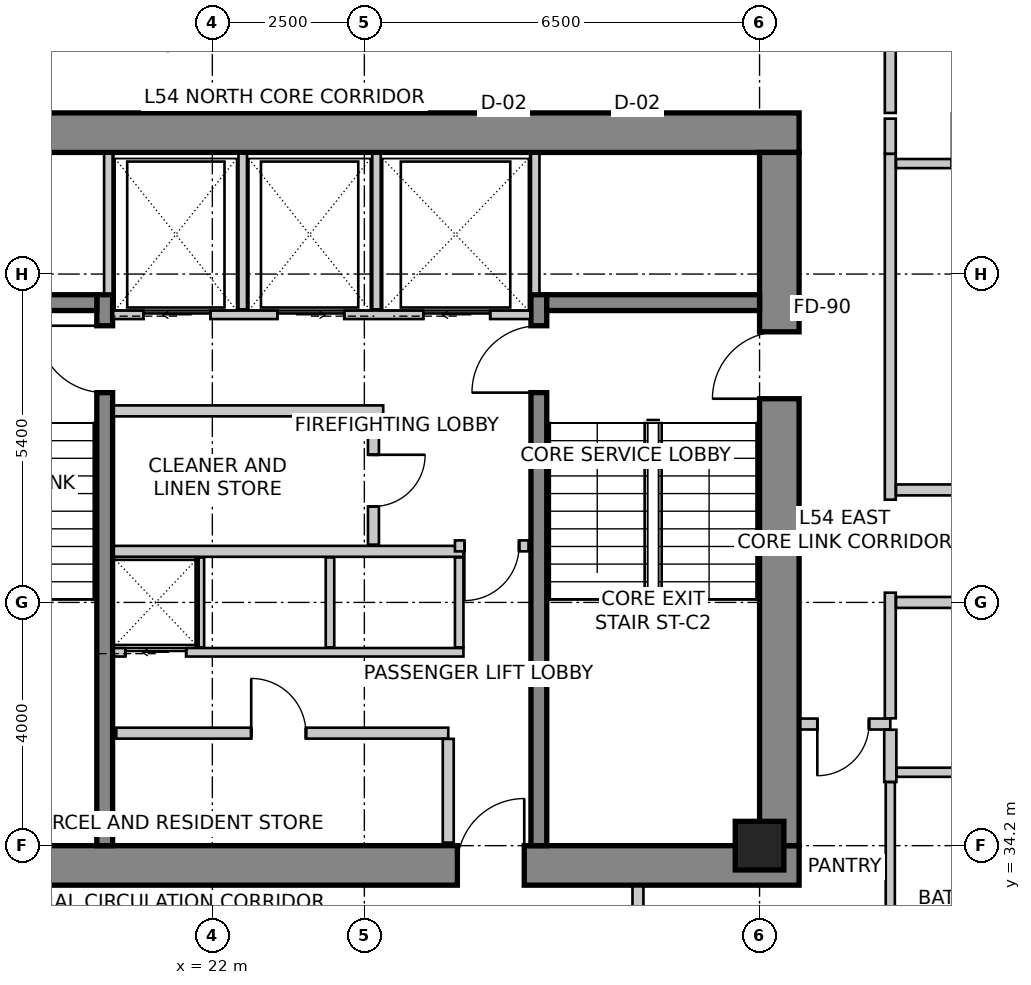
"""IFC4 building model, lengths in metres.
Left out: names, types, materials, properties, quantities, classifications, styles, units other than length and angle.
Written with IfcOpenShell. Run it as: python <this file> out.ifc"""

import sys

from ifc_helpers import new_model, si_unit, direction, frame, frame_2d, origin, origin_2d, place, context, subcontext, project, spatial, rectangle, extrude, source, transform, mapped, element, fill, save


model = new_model("IFC4")
c1 = context("Model", 3, precision=1e-05, world=origin(), true_north=direction((0.0, 1.0)))
c2 = subcontext(c1, "Body", "Model", "MODEL_VIEW")
j1 = project(units=[si_unit("LENGTHUNIT", "METRE"), si_unit("PLANEANGLEUNIT", "RADIAN")], contexts=[c1])
p1 = place(None, origin())
s1 = spatial("IfcSite", under=j1, at=p1, CompositionType="ELEMENT")
p2 = place(p1, origin())
s2 = spatial("IfcBuilding", under=s1, at=p2, CompositionType="ELEMENT")
p3 = place(p2, frame((0.0, 0.0, 214.9)))
s3 = spatial("IfcBuildingStorey", under=s2, at=p3, CompositionType="ELEMENT", Elevation=214.9)
p4 = place(p3, frame((15.95, 45.925, 0.0), z_axis=(0.0, 0.0, 1.0), x_axis=(1.0, 0.0, 0.0)))
e1 = element("IfcWall", 1, at=p4, inside=s3, PredefinedType="SHEAR", context=c2, shape_type="SweptSolid", body=[
    extrude(rectangle(XDim=15.7, YDim=0.65, at=frame_2d((7.85, 0.0))), origin(), (0.0, 0.0, 1.0), 3.5),
])
p5 = place(p3, frame((15.95, 33.875, 0.0), z_axis=(0.0, 0.0, 1.0), x_axis=(1.0, 0.0, 0.0)))
e2 = element("IfcWall", 2, at=p5, inside=s3, PredefinedType="SHEAR", context=c2, shape_type="SweptSolid", body=[
    extrude(rectangle(XDim=15.7, YDim=0.65, at=frame_2d((7.85, 0.0))), origin(), (0.0, 0.0, 1.0), 3.5),
])
m1 = source(origin(), c2, "Body", "SweptSolid", [
    extrude(rectangle(XDim=1.1, YDim=2.15, at=frame_2d((0.55, 1.075))), frame((0.0, 0.335, 0.0), z_axis=(0.0, -1.0, 0.0), x_axis=(1.0, 0.0, 0.0)), (0.0, 0.0, 1.0), 0.67),
])
p6 = place(p5, frame((10.08, 0.0, 0.0)))
e3 = element("IfcOpeningElement", 3, at=p6, cuts=e2, PredefinedType="OPENING", context=c2, shape_type="MappedRepresentation", body=[
    mapped(m1, transform((0.0, 0.0, 0.0), scale=1.0)),
])
p7 = place(p3, frame((31.325, 34.2, 0.0), z_axis=(0.0, 0.0, 1.0), x_axis=(0.0, 1.0, 0.0)))
e4 = element("IfcWall", 4, at=p7, inside=s3, PredefinedType="SHEAR", context=c2, shape_type="SweptSolid", body=[
    extrude(rectangle(XDim=11.4, YDim=0.65, at=frame_2d((5.7, 0.0))), origin(), (0.0, 0.0, 1.0), 3.5),
])
p8 = place(p7, frame((7.35, 0.0, 0.0)))
e5 = element("IfcOpeningElement", 5, at=p8, cuts=e4, PredefinedType="OPENING", context=c2, shape_type="MappedRepresentation", body=[
    mapped(m1, transform((0.0, 0.0, 0.0), scale=1.0)),
])
p9 = place(p3, frame((20.23, 34.2, 0.0), z_axis=(0.0, 0.0, 1.0), x_axis=(0.0, 1.0, 0.0)))
e6 = element("IfcWall", 6, at=p9, inside=s3, PredefinedType="SHEAR", context=c2, shape_type="SweptSolid", body=[
    extrude(rectangle(XDim=9.06, YDim=0.26, at=frame_2d((4.53, 0.0))), origin(), (0.0, 0.0, 1.0), 3.5),
])
m2 = source(origin(), c2, "Body", "SweptSolid", [
    extrude(rectangle(XDim=1.1, YDim=2.15, at=frame_2d((0.55, 1.075))), frame((0.0, 0.14, 0.0), z_axis=(0.0, -1.0, 0.0), x_axis=(1.0, 0.0, 0.0)), (0.0, 0.0, 1.0), 0.28),
])
p10 = place(p9, frame((7.45, 0.0, 0.0)))
e7 = element("IfcOpeningElement", 7, at=p10, cuts=e6, PredefinedType="OPENING", context=c2, shape_type="MappedRepresentation", body=[
    mapped(m2, transform((0.0, 0.0, 0.0), scale=1.0)),
])
p11 = place(p3, frame((27.37, 34.2, 0.0), z_axis=(0.0, 0.0, 1.0), x_axis=(0.0, 1.0, 0.0)))
e8 = element("IfcWall", 8, at=p11, inside=s3, PredefinedType="SHEAR", context=c2, shape_type="SweptSolid", body=[
    extrude(rectangle(XDim=9.06, YDim=0.26, at=frame_2d((4.53, 0.0))), origin(), (0.0, 0.0, 1.0), 3.5),
])
p12 = place(p11, frame((7.45, 0.0, 0.0)))
e9 = element("IfcOpeningElement", 9, at=p12, cuts=e8, PredefinedType="OPENING", context=c2, shape_type="MappedRepresentation", body=[
    mapped(m2, transform((0.0, 0.0, 0.0), scale=1.0)),
])
for number, where, z_axis, x_axis in (
    (10, (16.6, 43.13, 0.0), (0.0, 0.0, 1.0), (1.0, 0.0, 0.0)),
    (11, (27.5, 43.13, 0.0), (0.0, 0.0, 1.0), (1.0, 0.0, 0.0)),
):
    element("IfcWall", number, at=place(p3, frame(where, z_axis=z_axis, x_axis=x_axis)), inside=s3, PredefinedType="SHEAR", context=c2, shape_type="SweptSolid", body=[
        extrude(rectangle(XDim=3.5, YDim=0.26, at=frame_2d((1.75, 0.0))), origin(), (0.0, 0.0, 1.0), 3.5),
    ])
m3 = source(origin(), c2, "Body", "SweptSolid", [
    extrude(rectangle(XDim=0.8, YDim=0.8, at=origin_2d()), origin(), (0.0, 0.0, 1.0), 3.5),
])
p13 = place(p3, frame((31.0, 34.2, 0.0), z_axis=(0.0, 0.0, 1.0), x_axis=(1.0, 0.0, 0.0)))
e12 = element("IfcColumn", 12, at=p13, inside=s3, PredefinedType="COLUMN", context=c2, shape_type="MappedRepresentation", body=[
    mapped(m3, transform((0.0, 0.0, 0.0), scale=1.0)),
])
p14 = place(p3, frame((21.874, 52.742, 0.0), z_axis=(0.0, 0.0, 1.0), x_axis=(-0.84365659959, -0.536883173482, 0.0)))
e13 = element("IfcWall", 13, at=p14, inside=s3, PredefinedType="SOLIDWALL", context=c2, shape_type="SweptSolid", body=[
    extrude(rectangle(XDim=10.283, YDim=0.3, at=frame_2d((5.142, 0.0))), origin(), (0.0, 0.0, 1.0), 3.25),
])
m4 = source(origin(), c2, "Body", "SweptSolid", [
    extrude(rectangle(XDim=2.1, YDim=2.0, at=frame_2d((1.05, 1.0))), frame((0.0, 0.16, 0.0), z_axis=(0.0, -1.0, 0.0), x_axis=(1.0, 0.0, 0.0)), (0.0, 0.0, 1.0), 0.32),
])
p15 = place(p14, frame((3.457, 0.0, 0.85)))
e14 = element("IfcOpeningElement", 14, at=p15, cuts=e13, PredefinedType="OPENING", context=c2, shape_type="MappedRepresentation", body=[
    mapped(m4, transform((0.0, 0.0, 0.0), scale=1.0)),
])
p16 = place(p3, frame((20.37, 42.93, 0.0), z_axis=(0.0, 0.0, 1.0), x_axis=(1.0, 0.0, 0.0)))
e15 = element("IfcWall", 15, at=p16, inside=s3, PredefinedType="SOLIDWALL", context=c2, shape_type="SweptSolid", body=[
    extrude(rectangle(XDim=6.86, YDim=0.14, at=frame_2d((3.43, 0.0))), origin(), (0.0, 0.0, 1.0), 3.25),
])
m5 = source(origin(), c2, "Body", "SweptSolid", [
    extrude(rectangle(XDim=1.1, YDim=2.15, at=frame_2d((0.55, 1.075))), frame((0.0, 0.08, 0.0), z_axis=(0.0, -1.0, 0.0), x_axis=(1.0, 0.0, 0.0)), (0.0, 0.0, 1.0), 0.16),
])
p17 = place(p16, frame((0.5, 0.0, 0.0)))
e16 = element("IfcOpeningElement", 16, at=p17, cuts=e15, PredefinedType="OPENING", context=c2, shape_type="MappedRepresentation", body=[
    mapped(m5, transform((0.0, 0.0, 0.0), scale=1.0)),
])
p18 = place(p16, frame((2.7, 0.0, 0.0)))
e17 = element("IfcOpeningElement", 17, at=p18, cuts=e15, PredefinedType="OPENING", context=c2, shape_type="MappedRepresentation", body=[
    mapped(m5, transform((0.0, 0.0, 0.0), scale=1.0)),
])
p19 = place(p16, frame((5.1, 0.0, 0.0)))
e18 = element("IfcOpeningElement", 18, at=p19, cuts=e15, PredefinedType="OPENING", context=c2, shape_type="MappedRepresentation", body=[
    mapped(m5, transform((0.0, 0.0, 0.0), scale=1.0)),
])
for number, where, z_axis, x_axis in (
    (19, (20.29, 43.28, 0.0), (0.0, 0.0, 1.0), (0.0, 1.0, 0.0)),
    (20, (27.31, 43.28, 0.0), (0.0, 0.0, 1.0), (0.0, 1.0, 0.0)),
):
    element("IfcWall", number, at=place(p3, frame(where, z_axis=z_axis, x_axis=x_axis)), inside=s3, PredefinedType="SOLIDWALL", context=c2, shape_type="SweptSolid", body=[
        extrude(rectangle(XDim=2.3, YDim=0.14, at=frame_2d((1.15, 0.0))), origin(), (0.0, 0.0, 1.0), 3.25),
    ])
for number, where, z_axis, x_axis in (
    (21, (22.5, 43.02, 0.0), (0.0, 0.0, 1.0), (0.0, 1.0, 0.0)),
    (22, (24.7, 43.02, 0.0), (0.0, 0.0, 1.0), (0.0, 1.0, 0.0)),
):
    element("IfcWall", number, at=place(p3, frame(where, z_axis=z_axis, x_axis=x_axis)), inside=s3, PredefinedType="SOLIDWALL", context=c2, shape_type="SweptSolid", body=[
        extrude(rectangle(XDim=2.56, YDim=0.14, at=frame_2d((1.28, 0.0))), origin(), (0.0, 0.0, 1.0), 3.25),
    ])
p20 = place(p3, frame((20.38, 37.38, 0.0), z_axis=(0.0, 0.0, 1.0), x_axis=(1.0, 0.0, 0.0)))
e23 = element("IfcWall", 23, at=p20, inside=s3, PredefinedType="SOLIDWALL", context=c2, shape_type="SweptSolid", body=[
    extrude(rectangle(XDim=5.75, YDim=0.14, at=frame_2d((2.875, 0.0))), origin(), (0.0, 0.0, 1.0), 3.25),
])
m6 = source(origin(), c2, "Body", "SweptSolid", [
    extrude(rectangle(XDim=1.0, YDim=2.15, at=frame_2d((0.5, 1.075))), frame((0.0, 0.08, 0.0), z_axis=(0.0, -1.0, 0.0), x_axis=(1.0, 0.0, 0.0)), (0.0, 0.0, 1.0), 0.16),
])
p21 = place(p20, frame((0.19, 0.0, 0.0)))
e24 = element("IfcOpeningElement", 24, at=p21, cuts=e23, PredefinedType="OPENING", context=c2, shape_type="MappedRepresentation", body=[
    mapped(m6, transform((0.0, 0.0, 0.0), scale=1.0)),
])
p22 = place(p3, frame((20.38, 39.04, 0.0), z_axis=(0.0, 0.0, 1.0), x_axis=(1.0, 0.0, 0.0)))
e25 = element("IfcWall", 25, at=p22, inside=s3, PredefinedType="SOLIDWALL", context=c2, shape_type="SweptSolid", body=[
    extrude(rectangle(XDim=5.75, YDim=0.18, at=frame_2d((2.875, 0.0))), origin(), (0.0, 0.0, 1.0), 3.25),
])
for number, where, z_axis, x_axis in (
    (26, (26.06, 37.46, 0.0), (0.0, 0.0, 1.0), (0.0, 1.0, 0.0)),
    (27, (21.795, 37.46, 0.0), (0.0, 0.0, 1.0), (0.0, 1.0, 0.0)),
    (28, (23.935, 37.46, 0.0), (0.0, 0.0, 1.0), (0.0, 1.0, 0.0)),
):
    element("IfcWall", number, at=place(p3, frame(where, z_axis=z_axis, x_axis=x_axis)), inside=s3, PredefinedType="SOLIDWALL", context=c2, shape_type="SweptSolid", body=[
        extrude(rectangle(XDim=1.48, YDim=0.14, at=frame_2d((0.74, 0.0))), origin(), (0.0, 0.0, 1.0), 3.25),
    ])
p23 = place(p3, frame((24.81, 41.35, 0.0), z_axis=(0.0, 0.0, 1.0), x_axis=(-1.0, 0.0, 0.0)))
e29 = element("IfcWall", 29, at=p23, inside=s3, PredefinedType="PARTITIONING", context=c2, shape_type="SweptSolid", body=[
    extrude(rectangle(XDim=4.43, YDim=0.18, at=frame_2d((2.215, 0.0))), origin(), (0.0, 0.0, 1.0), 3.25),
])
p24 = place(p3, frame((24.65, 41.256, 0.0), z_axis=(0.0, 0.0, 1.0), x_axis=(0.0, -1.0, 0.0)))
e30 = element("IfcWall", 30, at=p24, inside=s3, PredefinedType="PARTITIONING", context=c2, shape_type="SweptSolid", body=[
    extrude(rectangle(XDim=2.106, YDim=0.18, at=frame_2d((1.053, 0.0))), origin(), (0.0, 0.0, 1.0), 3.25),
])
m7 = source(origin(), c2, "Body", "SweptSolid", [
    extrude(rectangle(XDim=0.85, YDim=2.15, at=frame_2d((0.425, 1.075))), frame((0.0, 0.1, 0.0), z_axis=(0.0, -1.0, 0.0), x_axis=(1.0, 0.0, 0.0)), (0.0, 0.0, 1.0), 0.2),
])
p25 = place(p24, frame((0.628, 0.0, 0.0)))
e31 = element("IfcOpeningElement", 31, at=p25, cuts=e30, PredefinedType="OPENING", context=c2, shape_type="MappedRepresentation", body=[
    mapped(m7, transform((0.0, 0.0, 0.0), scale=1.0)),
])
p26 = place(p3, frame((27.2, 39.13, 0.0), z_axis=(0.0, 0.0, 1.0), x_axis=(-1.0, 0.0, 0.0)))
e32 = element("IfcWall", 32, at=p26, inside=s3, PredefinedType="PARTITIONING", context=c2, shape_type="SweptSolid", body=[
    extrude(rectangle(XDim=1.21, YDim=0.18, at=frame_2d((0.605, 0.0))), origin(), (0.0, 0.0, 1.0), 3.25),
])
m8 = source(origin(), c2, "Body", "SweptSolid", [
    extrude(rectangle(XDim=0.9, YDim=2.15, at=frame_2d((0.45, 1.075))), frame((0.0, 0.1, 0.0), z_axis=(0.0, -1.0, 0.0), x_axis=(1.0, 0.0, 0.0)), (0.0, 0.0, 1.0), 0.2),
])
p27 = place(p26, frame((0.155, 0.0, 0.0)))
e33 = element("IfcOpeningElement", 33, at=p27, cuts=e32, PredefinedType="OPENING", context=c2, shape_type="MappedRepresentation", body=[
    mapped(m8, transform((0.0, 0.0, 0.0), scale=1.0)),
])
p28 = place(p3, frame((20.42, 36.05, 0.0), z_axis=(0.0, 0.0, 1.0), x_axis=(1.0, 0.0, 0.0)))
e34 = element("IfcWall", 34, at=p28, inside=s3, PredefinedType="PARTITIONING", context=c2, shape_type="SweptSolid", body=[
    extrude(rectangle(XDim=5.46, YDim=0.18, at=frame_2d((2.73, 0.0))), origin(), (0.0, 0.0, 1.0), 3.25),
])
p29 = place(p28, frame((2.219, 0.0, 0.0)))
e35 = element("IfcOpeningElement", 35, at=p29, cuts=e34, PredefinedType="OPENING", context=c2, shape_type="MappedRepresentation", body=[
    mapped(m8, transform((0.0, 0.0, 0.0), scale=1.0)),
])
p30 = place(p3, frame((25.88, 35.956, 0.0), z_axis=(0.0, 0.0, 1.0), x_axis=(0.0, -1.0, 0.0)))
e36 = element("IfcWall", 36, at=p30, inside=s3, PredefinedType="PARTITIONING", context=c2, shape_type="SweptSolid", body=[
    extrude(rectangle(XDim=1.706, YDim=0.18, at=frame_2d((0.853, 0.0))), origin(), (0.0, 0.0, 1.0), 2.542),
])
p31 = place(p3, frame((29.0, 33.53, 0.0), z_axis=(0.0, 0.0, 1.0), x_axis=(0.0, -1.0, 0.0)))
e37 = element("IfcWall", 37, at=p31, inside=s3, PredefinedType="PARTITIONING", context=c2, shape_type="SweptSolid", body=[
    extrude(rectangle(XDim=1.127, YDim=0.18, at=frame_2d((0.563, 0.0))), origin(), (0.0, 0.0, 1.0), 3.25),
])
p32 = place(p3, frame((33.15, 47.706, 0.0), z_axis=(0.0, 0.0, 1.0), x_axis=(0.0, -1.0, 0.0)))
e38 = element("IfcWall", 38, at=p32, inside=s3, PredefinedType="PARTITIONING", context=c2, shape_type="SweptSolid", body=[
    extrude(rectangle(XDim=1.456, YDim=0.18, at=frame_2d((0.728, 0.0))), origin(), (0.0, 0.0, 1.0), 2.835),
])
p33 = place(p3, frame((33.15, 36.2, 0.0), z_axis=(0.0, 0.0, 1.0), x_axis=(-1.0, 0.0, 0.0)))
e39 = element("IfcWall", 39, at=p33, inside=s3, PredefinedType="PARTITIONING", context=c2, shape_type="SweptSolid", body=[
    extrude(rectangle(XDim=1.48, YDim=0.18, at=frame_2d((0.74, 0.0))), origin(), (0.0, 0.0, 1.0), 3.25),
])
p34 = place(p33, frame((0.35, 0.0, 0.0)))
e40 = element("IfcOpeningElement", 40, at=p34, cuts=e39, PredefinedType="OPENING", context=c2, shape_type="MappedRepresentation", body=[
    mapped(m7, transform((0.0, 0.0, 0.0), scale=1.0)),
])
p35 = place(p3, frame((33.15, 45.577, 0.0), z_axis=(0.0, 0.0, 1.0), x_axis=(0.0, -1.0, 0.0)))
e41 = element("IfcWall", 41, at=p35, inside=s3, PredefinedType="PARTITIONING", context=c2, shape_type="SweptSolid", body=[
    extrude(rectangle(XDim=5.687, YDim=0.18, at=frame_2d((2.844, 0.0))), origin(), (0.0, 0.0, 1.0), 2.688),
])
p36 = place(p3, frame((33.15, 46.156, 0.0), z_axis=(0.0, 0.0, 1.0), x_axis=(0.0, -1.0, 0.0)))
e42 = element("IfcWall", 42, at=p36, inside=s3, PredefinedType="PARTITIONING", context=c2, shape_type="SweptSolid", body=[
    extrude(rectangle(XDim=0.577, YDim=0.18, at=frame_2d((0.289, 0.0))), origin(), (0.0, 0.0, 1.0), 2.688),
])
p37 = place(p3, frame((33.15, 38.36, 0.0), z_axis=(0.0, 0.0, 1.0), x_axis=(0.0, -1.0, 0.0)))
e43 = element("IfcWall", 43, at=p37, inside=s3, PredefinedType="PARTITIONING", context=c2, shape_type="SweptSolid", body=[
    extrude(rectangle(XDim=2.066, YDim=0.18, at=frame_2d((1.033, 0.0))), origin(), (0.0, 0.0, 1.0), 3.25),
])
p38 = place(p3, frame((33.244, 40.05, 0.0), z_axis=(0.0, 0.0, 1.0), x_axis=(1.0, 0.0, 0.0)))
e44 = element("IfcWall", 44, at=p38, inside=s3, PredefinedType="PARTITIONING", context=c2, shape_type="SweptSolid", body=[
    extrude(rectangle(XDim=7.062, YDim=0.18, at=frame_2d((3.531, 0.0))), origin(), (0.0, 0.0, 1.0), 2.766),
])
p39 = place(p38, frame((2.959, 0.0, 0.0)))
e45 = element("IfcOpeningElement", 45, at=p39, cuts=e44, PredefinedType="OPENING", context=c2, shape_type="MappedRepresentation", body=[
    mapped(m8, transform((0.0, 0.0, 0.0), scale=1.0)),
])
p40 = place(p3, frame((40.06, 38.2, 0.0), z_axis=(0.0, 0.0, 1.0), x_axis=(-1.0, 0.0, 0.0)))
e46 = element("IfcWall", 46, at=p40, inside=s3, PredefinedType="PARTITIONING", context=c2, shape_type="SweptSolid", body=[
    extrude(rectangle(XDim=6.816, YDim=0.18, at=frame_2d((3.408, 0.0))), origin(), (0.0, 0.0, 1.0), 2.766),
])
p41 = place(p40, frame((2.958, 0.0, 0.0)))
e47 = element("IfcOpeningElement", 47, at=p41, cuts=e46, PredefinedType="OPENING", context=c2, shape_type="MappedRepresentation", body=[
    mapped(m8, transform((0.0, 0.0, 0.0), scale=1.0)),
])
p42 = place(p3, frame((33.15, 36.106, 0.0), z_axis=(0.0, 0.0, 1.0), x_axis=(0.0, -1.0, 0.0)))
e48 = element("IfcWall", 48, at=p42, inside=s3, PredefinedType="PARTITIONING", context=c2, shape_type="SweptSolid", body=[
    extrude(rectangle(XDim=0.859, YDim=0.2, at=frame_2d((0.429, 0.0))), origin(), (0.0, 0.0, 1.0), 3.25),
])
p43 = place(p3, frame((33.15, 35.245, 0.0), z_axis=(0.0, 0.0, 1.0), x_axis=(0.0, -1.0, 0.0)))
e49 = element("IfcWall", 49, at=p43, inside=s3, PredefinedType="PARTITIONING", context=c2, shape_type="SweptSolid", body=[
    extrude(rectangle(XDim=2.288, YDim=0.15, at=frame_2d((1.144, 0.0))), origin(), (0.0, 0.0, 1.0), 3.25),
])
p44 = place(p3, frame((33.244, 45.417, 0.0), z_axis=(0.0, 0.0, 1.0), x_axis=(1.0, 0.0, 0.0)))
e50 = element("IfcWall", 50, at=p44, inside=s3, PredefinedType="PARTITIONING", context=c2, shape_type="SweptSolid", body=[
    extrude(rectangle(XDim=2.816, YDim=0.15, at=frame_2d((1.408, 0.0))), origin(), (0.0, 0.0, 1.0), 2.835),
])
m9 = source(origin(), c2, "Body", "SweptSolid", [
    extrude(rectangle(XDim=0.85, YDim=2.15, at=frame_2d((0.425, 1.075))), frame((0.0, 0.085, 0.0), z_axis=(0.0, -1.0, 0.0), x_axis=(1.0, 0.0, 0.0)), (0.0, 0.0, 1.0), 0.17),
])
p45 = place(p44, frame((0.919, 0.0, 0.0)))
e51 = element("IfcOpeningElement", 51, at=p45, cuts=e50, PredefinedType="OPENING", context=c2, shape_type="MappedRepresentation", body=[
    mapped(m9, transform((0.0, 0.0, 0.0), scale=1.0)),
])
p46 = place(p3, frame((36.06, 35.407, 0.0), z_axis=(0.0, 0.0, 1.0), x_axis=(-1.0, 0.0, 0.0)))
e52 = element("IfcWall", 52, at=p46, inside=s3, PredefinedType="PARTITIONING", context=c2, shape_type="SweptSolid", body=[
    extrude(rectangle(XDim=2.806, YDim=0.15, at=frame_2d((1.403, 0.0))), origin(), (0.0, 0.0, 1.0), 3.25),
])
p47 = place(p46, frame((0.915, 0.0, 0.0)))
e53 = element("IfcOpeningElement", 53, at=p47, cuts=e52, PredefinedType="OPENING", context=c2, shape_type="MappedRepresentation", body=[
    mapped(m9, transform((0.0, 0.0, 0.0), scale=1.0)),
])
m10 = source(origin(), c2, "Body", "SweptSolid", [
    extrude(rectangle(XDim=1.1, YDim=2.15, at=frame_2d((0.55, 1.075))), frame((0.0, 0.025, 0.0), z_axis=(0.0, -1.0, 0.0), x_axis=(1.0, 0.0, 0.0)), (0.0, 0.0, 1.0), 0.05),
])
p48 = place(p17, origin())
e54 = element("IfcDoor", 54, at=p48, inside=s3, OperationType="SLIDING_TO_LEFT", PredefinedType="DOOR", context=c2, shape_type="MappedRepresentation", body=[
    mapped(m10, transform((0.0, 0.0, 0.0), scale=1.0)),
])
fill(e16, e54)
p49 = place(p18, origin())
e55 = element("IfcDoor", 55, at=p49, inside=s3, OperationType="SLIDING_TO_RIGHT", PredefinedType="DOOR", context=c2, shape_type="MappedRepresentation", body=[
    mapped(m10, transform((0.0, 0.0, 0.0), scale=1.0)),
])
fill(e17, e55)
m11 = source(origin(), c2, "Body", "SweptSolid", [
    extrude(rectangle(XDim=1.1, YDim=2.15, at=frame_2d((0.55, 1.075))), frame((0.0, 0.025, 0.0), z_axis=(0.0, -1.0, 0.0), x_axis=(1.0, 0.0, 0.0)), (0.0, 0.0, 1.0), 0.05),
])
p50 = place(p19, origin())
e56 = element("IfcDoor", 56, at=p50, inside=s3, OperationType="SLIDING_TO_LEFT", PredefinedType="DOOR", context=c2, shape_type="MappedRepresentation", body=[
    mapped(m11, transform((0.0, 0.0, 0.0), scale=1.0)),
])
fill(e18, e56)
m12 = source(origin(), c2, "Body", "SweptSolid", [
    extrude(rectangle(XDim=1.0, YDim=2.15, at=frame_2d((0.5, 1.075))), frame((0.0, 0.025, 0.0), z_axis=(0.0, -1.0, 0.0), x_axis=(1.0, 0.0, 0.0)), (0.0, 0.0, 1.0), 0.05),
])
p51 = place(p21, origin())
e57 = element("IfcDoor", 57, at=p51, inside=s3, OperationType="SLIDING_TO_LEFT", PredefinedType="DOOR", context=c2, shape_type="MappedRepresentation", body=[
    mapped(m12, transform((0.0, 0.0, 0.0), scale=1.0)),
])
fill(e24, e57)
m13 = source(origin(), c2, "Body", "SweptSolid", [
    extrude(rectangle(XDim=1.1, YDim=2.15, at=frame_2d((0.55, 1.075))), frame((0.0, 0.025, 0.0), z_axis=(0.0, -1.0, 0.0), x_axis=(1.0, 0.0, 0.0)), (0.0, 0.0, 1.0), 0.05),
])
p52 = place(p10, origin())
e58 = element("IfcDoor", 58, at=p52, inside=s3, OperationType="SINGLE_SWING_RIGHT", PredefinedType="DOOR", context=c2, shape_type="MappedRepresentation", body=[
    mapped(m13, transform((0.0, 0.0, 0.0), scale=1.0)),
])
fill(e7, e58)
p53 = place(p12, origin())
e59 = element("IfcDoor", 59, at=p53, inside=s3, OperationType="SINGLE_SWING_LEFT", PredefinedType="DOOR", context=c2, shape_type="MappedRepresentation", body=[
    mapped(m13, transform((0.0, 0.0, 0.0), scale=1.0)),
])
fill(e9, e59)
p54 = place(p8, origin())
e60 = element("IfcDoor", 60, at=p54, inside=s3, OperationType="SINGLE_SWING_LEFT", PredefinedType="DOOR", context=c2, shape_type="MappedRepresentation", body=[
    mapped(m13, transform((0.0, 0.0, 0.0), scale=1.0)),
])
fill(e5, e60)
p55 = place(p6, origin())
e61 = element("IfcDoor", 61, at=p55, inside=s3, OperationType="SINGLE_SWING_RIGHT", PredefinedType="DOOR", context=c2, shape_type="MappedRepresentation", body=[
    mapped(m13, transform((0.0, 0.0, 0.0), scale=1.0)),
])
fill(e3, e61)
m14 = source(origin(), c2, "Body", "SweptSolid", [
    extrude(rectangle(XDim=0.85, YDim=2.15, at=frame_2d((0.425, 1.075))), frame((0.0, 0.025, 0.0), z_axis=(0.0, -1.0, 0.0), x_axis=(1.0, 0.0, 0.0)), (0.0, 0.0, 1.0), 0.05),
])
p56 = place(p25, origin())
e62 = element("IfcDoor", 62, at=p56, inside=s3, OperationType="SINGLE_SWING_LEFT", PredefinedType="DOOR", context=c2, shape_type="MappedRepresentation", body=[
    mapped(m14, transform((0.0, 0.0, 0.0), scale=1.0)),
])
fill(e31, e62)
m15 = source(origin(), c2, "Body", "SweptSolid", [
    extrude(rectangle(XDim=0.9, YDim=2.15, at=frame_2d((0.45, 1.075))), frame((0.0, 0.025, 0.0), z_axis=(0.0, -1.0, 0.0), x_axis=(1.0, 0.0, 0.0)), (0.0, 0.0, 1.0), 0.05),
])
p57 = place(p27, origin())
e63 = element("IfcDoor", 63, at=p57, inside=s3, OperationType="SINGLE_SWING_RIGHT", PredefinedType="DOOR", context=c2, shape_type="MappedRepresentation", body=[
    mapped(m15, transform((0.0, 0.0, 0.0), scale=1.0)),
])
fill(e33, e63)
p58 = place(p29, origin())
e64 = element("IfcDoor", 64, at=p58, inside=s3, OperationType="SINGLE_SWING_LEFT", PredefinedType="DOOR", context=c2, shape_type="MappedRepresentation", body=[
    mapped(m15, transform((0.0, 0.0, 0.0), scale=1.0)),
])
fill(e35, e64)
m16 = source(origin(), c2, "Body", "SweptSolid", [
    extrude(rectangle(XDim=0.85, YDim=2.15, at=frame_2d((0.425, 1.075))), frame((0.0, 0.025, 0.0), z_axis=(0.0, -1.0, 0.0), x_axis=(1.0, 0.0, 0.0)), (0.0, 0.0, 1.0), 0.05),
])
p59 = place(p34, origin())
e65 = element("IfcDoor", 65, at=p59, inside=s3, OperationType="SINGLE_SWING_RIGHT", PredefinedType="DOOR", context=c2, shape_type="MappedRepresentation", body=[
    mapped(m16, transform((0.0, 0.0, 0.0), scale=1.0)),
])
fill(e40, e65)
save(model, sys.argv[1])
